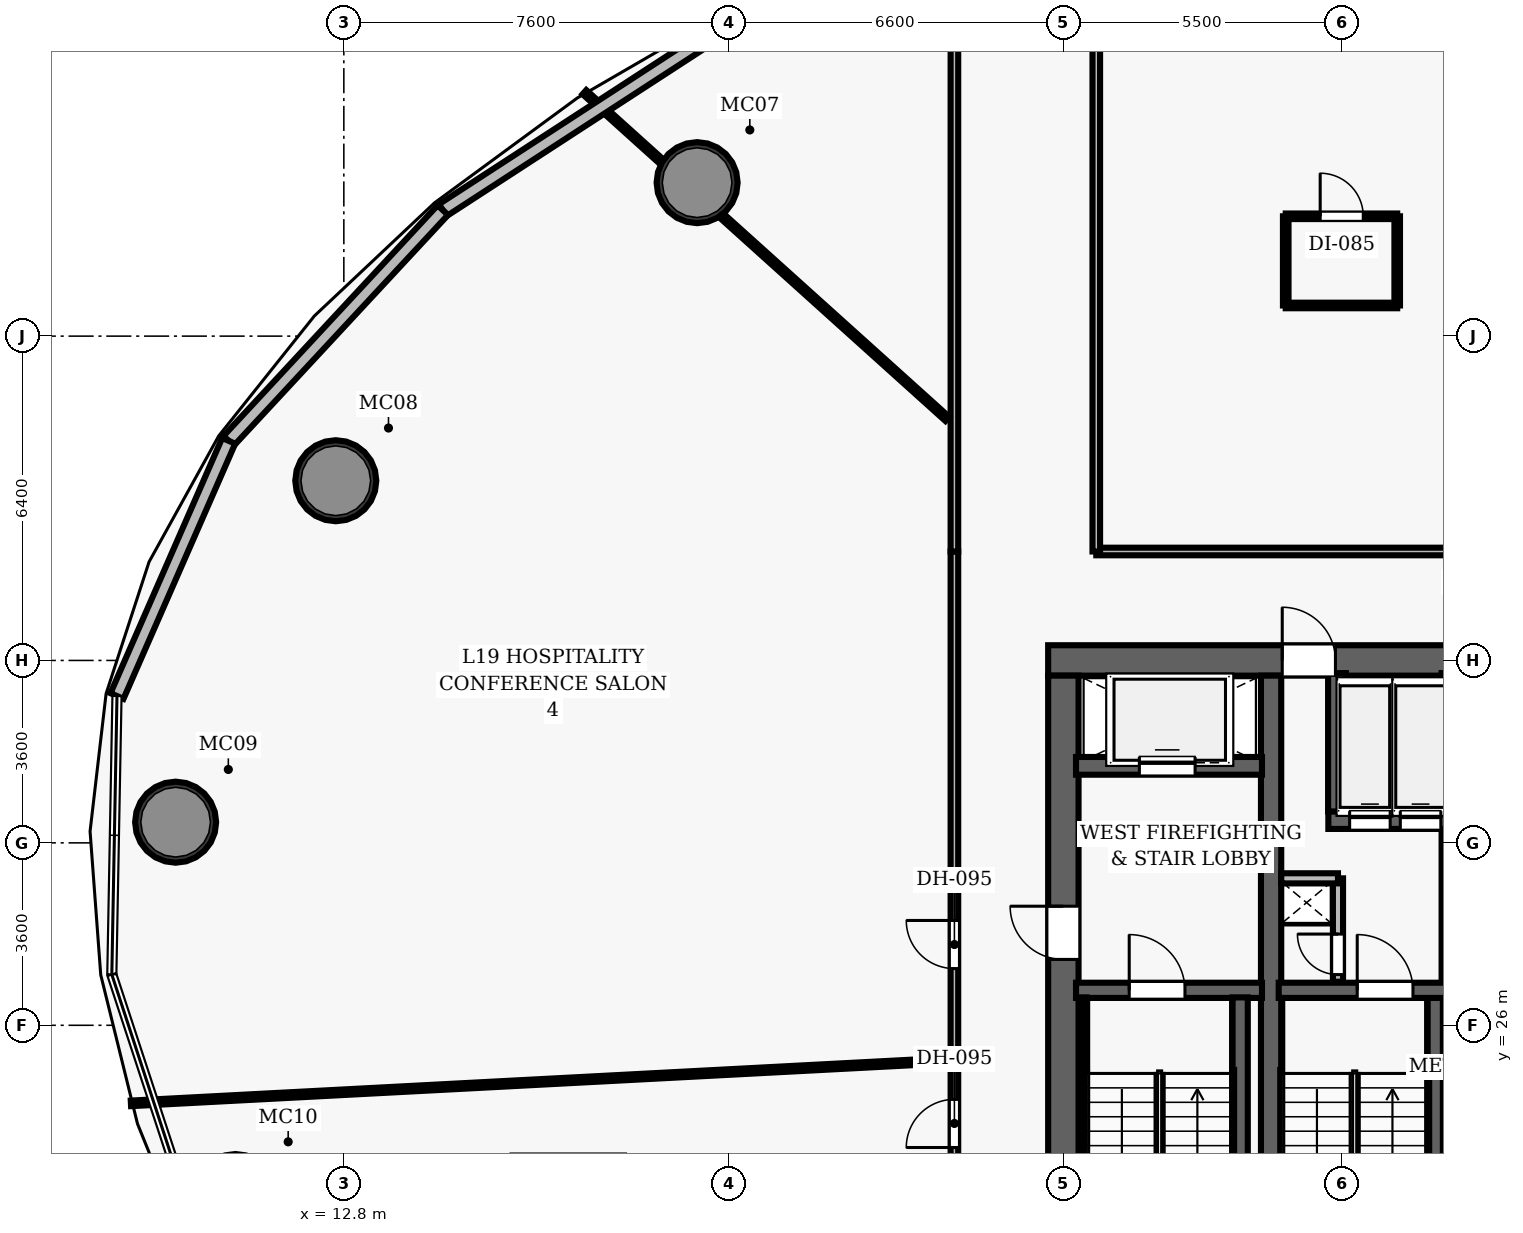
"""IFC4 building model, lengths in metres.
Left out: names, types, materials, properties, quantities, classifications, styles, units other than length and angle.
Written with IfcOpenShell. Run it as: python <this file> out.ifc"""

import sys

from ifc_helpers import new_model, si_unit, direction, frame, frame_2d, origin, origin_2d, place, context, subcontext, project, spatial, rectangle, hollow_circle, extrude, element, fill, save


model = new_model("IFC4")
c1 = context("Model", 3, precision=1e-05, world=origin(), true_north=direction((0.0, 1.0)))
c2 = subcontext(c1, "Body", "Model", "MODEL_VIEW")
j1 = project(units=[si_unit("LENGTHUNIT", "METRE"), si_unit("PLANEANGLEUNIT", "RADIAN")], contexts=[c1])
p1 = place(None, origin())
s1 = spatial("IfcSite", under=j1, at=p1, CompositionType="ELEMENT")
p2 = place(p1, origin())
s2 = spatial("IfcBuilding", under=s1, at=p2, CompositionType="ELEMENT")
p3 = place(p2, frame((0.0, 0.0, 83.4)))
s3 = spatial("IfcBuildingStorey", under=s2, at=p3, CompositionType="ELEMENT", Elevation=83.4)
p4 = place(p3, frame((26.7, 33.2, 0.0), z_axis=(0.0, 0.0, 1.0), x_axis=(1.0, 0.0, 0.0)))
e1 = element("IfcWall", 1, at=p4, inside=s3, PredefinedType="SHEAR", context=c2, shape_type="SweptSolid", body=[
    extrude(rectangle(XDim=22.6, YDim=0.6, at=frame_2d((11.3, 0.0))), origin(), (0.0, 0.0, 1.0), 3.5),
])
p5 = place(p4, frame((4.62, 0.0, 0.0)))
e2 = element("IfcOpeningElement", 2, at=p5, cuts=e1, PredefinedType="OPENING", context=c2, shape_type="SweptSolid", body=[
    extrude(rectangle(XDim=1.05, YDim=2.15, at=frame_2d((0.525, 1.075))), frame((0.0, 0.31, 0.0), z_axis=(0.0, -1.0, 0.0), x_axis=(1.0, 0.0, 0.0)), (0.0, 0.0, 1.0), 0.62),
])
p6 = place(p4, frame((14.52, 0.0, 0.0)))
e3 = element("IfcOpeningElement", 3, at=p6, cuts=e1, PredefinedType="OPENING", context=c2, shape_type="SweptSolid", body=[
    extrude(rectangle(XDim=1.05, YDim=2.15, at=frame_2d((0.525, 1.075))), frame((0.0, 0.31, 0.0), z_axis=(0.0, -1.0, 0.0), x_axis=(1.0, 0.0, 0.0)), (0.0, 0.0, 1.0), 0.62),
])
p7 = place(p3, frame((27.0, 19.1, 0.0), z_axis=(0.0, 0.0, 1.0), x_axis=(0.0, 1.0, 0.0)))
e4 = element("IfcWall", 4, at=p7, inside=s3, PredefinedType="SHEAR", context=c2, shape_type="SweptSolid", body=[
    extrude(rectangle(XDim=13.8, YDim=0.6, at=frame_2d((6.9, 0.0))), origin(), (0.0, 0.0, 1.0), 3.5),
])
p8 = place(p7, frame((8.2, 0.0, 0.0)))
e5 = element("IfcOpeningElement", 5, at=p8, cuts=e4, PredefinedType="OPENING", context=c2, shape_type="SweptSolid", body=[
    extrude(rectangle(XDim=1.05, YDim=2.15, at=frame_2d((0.525, 1.075))), frame((0.0, 0.31, 0.0), z_axis=(0.0, -1.0, 0.0), x_axis=(1.0, 0.0, 0.0)), (0.0, 0.0, 1.0), 0.62),
])
p9 = place(p3, frame((31.1, 19.1, 0.0), z_axis=(0.0, 0.0, 1.0), x_axis=(0.0, 1.0, 0.0)))
e6 = element("IfcWall", 6, at=p9, inside=s3, PredefinedType="SHEAR", context=c2, shape_type="SweptSolid", body=[
    extrude(rectangle(XDim=13.8, YDim=0.4, at=frame_2d((6.9, 0.0))), origin(), (0.0, 0.0, 1.0), 3.5),
])
for number, where, z_axis, x_axis in (
    (7, (19.772, 42.629, 0.0), (0.0, 0.0, 1.0), (1.0, 0.0, 0.0)),
    (8, (12.641, 36.746, 0.0), (0.0, 0.0, 1.0), (1.0, 0.0, 0.0)),
    (9, (9.48, 30.008, 0.0), (0.0, 0.0, 1.0), (1.0, 0.0, 0.0)),
):
    element("IfcColumn", number, at=place(p3, frame(where, z_axis=z_axis, x_axis=x_axis)), inside=s3, PredefinedType="COLUMN", context=c2, shape_type="SweptSolid", body=[
        extrude(hollow_circle(Radius=0.8, WallThickness=0.06, at=origin_2d()), origin(), (0.0, 0.0, 1.0), 3.5),
    ])
p10 = place(p3, frame((27.25, 26.69, 0.0), z_axis=(0.0, 0.0, 1.0), x_axis=(1.0, 0.0, 0.0)))
e10 = element("IfcWall", 10, at=p10, inside=s3, PredefinedType="SHEAR", context=c2, shape_type="SweptSolid", body=[
    extrude(rectangle(XDim=3.67, YDim=0.3, at=frame_2d((1.835, 0.0))), origin(), (0.0, 0.0, 1.0), 3.5),
])
p11 = place(p10, frame((1.05, 0.0, 0.0)))
e11 = element("IfcOpeningElement", 11, at=p11, cuts=e10, PredefinedType="OPENING", context=c2, shape_type="SweptSolid", body=[
    extrude(rectangle(XDim=1.1, YDim=2.15, at=frame_2d((0.55, 1.075))), frame((0.0, 0.16, 0.0), z_axis=(0.0, -1.0, 0.0), x_axis=(1.0, 0.0, 0.0)), (0.0, 0.0, 1.0), 0.32),
])
p12 = place(p3, frame((30.49, 19.05, 0.0), z_axis=(0.0, 0.0, 1.0), x_axis=(0.0, 1.0, 0.0)))
e12 = element("IfcWall", 12, at=p12, inside=s3, PredefinedType="SHEAR", context=c2, shape_type="SweptSolid", body=[
    extrude(rectangle(XDim=7.5, YDim=0.3, at=frame_2d((3.75, 0.0))), origin(), (0.0, 0.0, 1.0), 3.5),
])
p13 = place(p3, frame((27.395, 19.1, 0.0), z_axis=(0.0, 0.0, 1.0), x_axis=(0.0, 1.0, 0.0)))
e13 = element("IfcWall", 13, at=p13, inside=s3, PredefinedType="SHEAR", context=c2, shape_type="SweptSolid", body=[
    extrude(rectangle(XDim=7.45, YDim=0.12, at=frame_2d((3.725, 0.0))), origin(), (0.0, 0.0, 1.0), 3.5),
])
p14 = place(p3, frame((27.25, 31.12, 0.0), z_axis=(0.0, 0.0, 1.0), x_axis=(1.0, 0.0, 0.0)))
e14 = element("IfcWall", 14, at=p14, inside=s3, PredefinedType="SHEAR", context=c2, shape_type="SweptSolid", body=[
    extrude(rectangle(XDim=3.67, YDim=0.35, at=frame_2d((1.835, 0.0))), origin(), (0.0, 0.0, 1.0), 2.6),
])
p15 = place(p14, frame((1.25, 0.0, 0.0)))
e15 = element("IfcOpeningElement", 15, at=p15, cuts=e14, PredefinedType="OPENING", context=c2, shape_type="SweptSolid", body=[
    extrude(rectangle(XDim=1.1, YDim=2.15, at=frame_2d((0.55, 1.075))), frame((0.0, 0.185, 0.0), z_axis=(0.0, -1.0, 0.0), x_axis=(1.0, 0.0, 0.0)), (0.0, 0.0, 1.0), 0.37),
])
p16 = place(p3, frame((34.34, 19.05, 0.0), z_axis=(0.0, 0.0, 1.0), x_axis=(0.0, 1.0, 0.0)))
e16 = element("IfcWall", 16, at=p16, inside=s3, PredefinedType="SHEAR", context=c2, shape_type="SweptSolid", body=[
    extrude(rectangle(XDim=7.5, YDim=0.3, at=frame_2d((3.75, 0.0))), origin(), (0.0, 0.0, 1.0), 3.5),
])
p17 = place(p3, frame((34.64, 26.69, 0.0), z_axis=(0.0, 0.0, 1.0), x_axis=(0.0, 1.0, 0.0)))
e17 = element("IfcWall", 17, at=p17, inside=s3, PredefinedType="SHEAR", context=c2, shape_type="SweptSolid", body=[
    extrude(rectangle(XDim=6.26, YDim=0.35, at=frame_2d((3.13, 0.0))), origin(), (0.0, 0.0, 1.0), 3.5),
])
p18 = place(p3, frame((31.25, 26.69, 0.0), z_axis=(0.0, 0.0, 1.0), x_axis=(1.0, 0.0, 0.0)))
e18 = element("IfcWall", 18, at=p18, inside=s3, PredefinedType="SHEAR", context=c2, shape_type="SweptSolid", body=[
    extrude(rectangle(XDim=3.56, YDim=0.3, at=frame_2d((1.78, 0.0))), origin(), (0.0, 0.0, 1.0), 3.5),
])
p19 = place(p18, frame((1.55, 0.0, 0.0)))
e19 = element("IfcOpeningElement", 19, at=p19, cuts=e18, PredefinedType="OPENING", context=c2, shape_type="SweptSolid", body=[
    extrude(rectangle(XDim=1.1, YDim=2.15, at=frame_2d((0.55, 1.075))), frame((0.0, 0.16, 0.0), z_axis=(0.0, -1.0, 0.0), x_axis=(1.0, 0.0, 0.0)), (0.0, 0.0, 1.0), 0.32),
])
p20 = place(p3, frame((32.23, 30.05, 0.0), z_axis=(0.0, 0.0, 1.0), x_axis=(1.0, 0.0, 0.0)))
e20 = element("IfcWall", 20, at=p20, inside=s3, PredefinedType="SHEAR", context=c2, shape_type="SweptSolid", body=[
    extrude(rectangle(XDim=2.41, YDim=0.35, at=frame_2d((1.205, 0.0))), origin(), (0.0, 0.0, 1.0), 2.6),
])
p21 = place(p20, frame((0.42, 0.0, 0.0)))
e21 = element("IfcOpeningElement", 21, at=p21, cuts=e20, PredefinedType="OPENING", context=c2, shape_type="SweptSolid", body=[
    extrude(rectangle(XDim=0.8, YDim=2.15, at=frame_2d((0.4, 1.075))), frame((0.0, 0.185, 0.0), z_axis=(0.0, -1.0, 0.0), x_axis=(1.0, 0.0, 0.0)), (0.0, 0.0, 1.0), 0.37),
])
p22 = place(p20, frame((1.42, 0.0, 0.0)))
e22 = element("IfcOpeningElement", 22, at=p22, cuts=e20, PredefinedType="OPENING", context=c2, shape_type="SweptSolid", body=[
    extrude(rectangle(XDim=0.8, YDim=2.15, at=frame_2d((0.4, 1.075))), frame((0.0, 0.185, 0.0), z_axis=(0.0, -1.0, 0.0), x_axis=(1.0, 0.0, 0.0)), (0.0, 0.0, 1.0), 0.37),
])
p23 = place(p3, frame((32.4, 30.22, 0.0), z_axis=(0.0, 0.0, 1.0), x_axis=(0.0, 1.0, 0.0)))
e23 = element("IfcWall", 23, at=p23, inside=s3, PredefinedType="SHEAR", context=c2, shape_type="SweptSolid", body=[
    extrude(rectangle(XDim=2.73, YDim=0.35, at=frame_2d((1.365, 0.0))), origin(), (0.0, 0.0, 1.0), 2.6),
])
p24 = place(p3, frame((32.42, 26.86, 0.0), z_axis=(0.0, 0.0, 1.0), x_axis=(0.0, 1.0, 0.0)))
e24 = element("IfcWall", 24, at=p24, inside=s3, PredefinedType="PARTITIONING", context=c2, shape_type="SweptSolid", body=[
    extrude(rectangle(XDim=2.04, YDim=0.2, at=frame_2d((1.02, 0.0))), origin(), (0.0, 0.0, 1.0), 2.6),
])
p25 = place(p24, frame((0.14, 0.0, 0.0)))
e25 = element("IfcOpeningElement", 25, at=p25, cuts=e24, PredefinedType="OPENING", context=c2, shape_type="SweptSolid", body=[
    extrude(rectangle(XDim=0.8, YDim=2.05, at=frame_2d((0.4, 1.025))), frame((0.0, 0.11, 0.0), z_axis=(0.0, -1.0, 0.0), x_axis=(1.0, 0.0, 0.0)), (0.0, 0.0, 1.0), 0.22),
])
p26 = place(p3, frame((31.3, 28.9, 0.0), z_axis=(0.0, 0.0, 1.0), x_axis=(1.0, 0.0, 0.0)))
e26 = element("IfcWall", 26, at=p26, inside=s3, PredefinedType="PARTITIONING", context=c2, shape_type="SweptSolid", body=[
    extrude(rectangle(XDim=1.12, YDim=0.2, at=frame_2d((0.56, 0.0))), origin(), (0.0, 0.0, 1.0), 2.6),
])
p27 = place(p3, frame((27.65, 35.35, 0.0), z_axis=(0.0, 0.0, 1.0), x_axis=(1.0, 0.0, 0.0)))
e27 = element("IfcWall", 27, at=p27, inside=s3, PredefinedType="PARTITIONING", context=c2, shape_type="SweptSolid", body=[
    extrude(rectangle(XDim=23.5, YDim=0.15, at=frame_2d((11.75, 0.0))), origin(), (0.0, 0.0, 1.0), 2.6),
])
p28 = place(p27, frame((11.493, 0.0, 0.0)))
e28 = element("IfcOpeningElement", 28, at=p28, cuts=e27, PredefinedType="OPENING", context=c2, shape_type="SweptSolid", body=[
    extrude(rectangle(XDim=0.95, YDim=2.15, at=frame_2d((0.475, 1.075))), frame((0.0, 0.085, 0.0), z_axis=(0.0, -1.0, 0.0), x_axis=(1.0, 0.0, 0.0)), (0.0, 0.0, 1.0), 0.17),
])
p29 = place(p27, frame((7.137, 0.0, 0.0)))
e29 = element("IfcOpeningElement", 29, at=p29, cuts=e27, PredefinedType="OPENING", context=c2, shape_type="SweptSolid", body=[
    extrude(rectangle(XDim=0.95, YDim=2.15, at=frame_2d((0.475, 1.075))), frame((0.0, 0.085, 0.0), z_axis=(0.0, -1.0, 0.0), x_axis=(1.0, 0.0, 0.0)), (0.0, 0.0, 1.0), 0.17),
])
p30 = place(p3, frame((24.85, 19.45, 0.0), z_axis=(0.0, 0.0, 1.0), x_axis=(0.0, 1.0, 0.0)))
e30 = element("IfcWall", 30, at=p30, inside=s3, PredefinedType="PARTITIONING", context=c2, shape_type="SweptSolid", body=[
    extrude(rectangle(XDim=15.9, YDim=0.15, at=frame_2d((7.95, 0.0))), origin(), (0.0, 0.0, 1.0), 2.6),
])
p31 = place(p30, frame((7.669, 0.0, 0.0)))
e31 = element("IfcOpeningElement", 31, at=p31, cuts=e30, PredefinedType="OPENING", context=c2, shape_type="SweptSolid", body=[
    extrude(rectangle(XDim=0.95, YDim=2.15, at=frame_2d((0.475, 1.075))), frame((0.0, 0.085, 0.0), z_axis=(0.0, -1.0, 0.0), x_axis=(1.0, 0.0, 0.0)), (0.0, 0.0, 1.0), 0.17),
])
p32 = place(p30, frame((4.138, 0.0, 0.0)))
e32 = element("IfcOpeningElement", 32, at=p32, cuts=e30, PredefinedType="OPENING", context=c2, shape_type="SweptSolid", body=[
    extrude(rectangle(XDim=0.95, YDim=2.15, at=frame_2d((0.475, 1.075))), frame((0.0, 0.085, 0.0), z_axis=(0.0, -1.0, 0.0), x_axis=(1.0, 0.0, 0.0)), (0.0, 0.0, 1.0), 0.17),
])
for number, where, z_axis, x_axis in (
    (33, (24.85, 35.35, 0.0), (0.0, 0.0, 1.0), (0.0, 1.0, 0.0)),
    (34, (27.65, 35.35, 0.0), (0.0, 0.0, 1.0), (0.0, 1.0, 0.0)),
):
    element("IfcWall", number, at=place(p3, frame(where, z_axis=z_axis, x_axis=x_axis)), inside=s3, PredefinedType="PARTITIONING", context=c2, shape_type="SweptSolid", body=[
        extrude(rectangle(XDim=10.15, YDim=0.15, at=frame_2d((5.075, 0.0))), origin(), (0.0, 0.0, 1.0), 2.6),
    ])
p33 = place(p3, frame((24.71, 37.966, 0.0), z_axis=(0.0, 0.0, 1.0), x_axis=(-0.743136670625, 0.669139663129, 0.0)))
e35 = element("IfcWall", 35, at=p33, inside=s3, PredefinedType="PARTITIONING", context=c2, shape_type="SweptSolid", body=[
    extrude(rectangle(XDim=9.637, YDim=0.11, at=frame_2d((4.819, 0.0))), origin(), (0.0, 0.0, 1.0), 2.6),
])
p34 = place(p3, frame((24.71, 25.303, 0.0), z_axis=(0.0, 0.0, 1.0), x_axis=(-0.998629300498, -0.052340425941, 0.0)))
e36 = element("IfcWall", 36, at=p34, inside=s3, PredefinedType="PARTITIONING", context=c2, shape_type="SweptSolid", body=[
    extrude(rectangle(XDim=16.135, YDim=0.11, at=frame_2d((8.067, 0.0))), origin(), (0.0, 0.0, 1.0), 2.6),
])
p35 = place(p3, frame((31.389, 40.205, 0.0), z_axis=(0.0, 0.0, 1.0), x_axis=(1.0, 0.0, 0.0)))
e37 = element("IfcWall", 37, at=p35, inside=s3, PredefinedType="PARTITIONING", context=c2, shape_type="SweptSolid", body=[
    extrude(rectangle(XDim=2.2, YDim=0.11, at=frame_2d((1.1, 0.0))), origin(), (0.0, 0.0, 1.0), 2.6),
])
p36 = place(p3, frame((31.389, 41.965, 0.0), z_axis=(0.0, 0.0, 1.0), x_axis=(1.0, 0.0, 0.0)))
e38 = element("IfcWall", 38, at=p36, inside=s3, PredefinedType="PARTITIONING", context=c2, shape_type="SweptSolid", body=[
    extrude(rectangle(XDim=2.2, YDim=0.11, at=frame_2d((1.1, 0.0))), origin(), (0.0, 0.0, 1.0), 2.6),
])
p37 = place(p36, frame((0.68, 0.0, 0.0)))
e39 = element("IfcOpeningElement", 39, at=p37, cuts=e38, PredefinedType="OPENING", context=c2, shape_type="SweptSolid", body=[
    extrude(rectangle(XDim=0.85, YDim=2.1, at=frame_2d((0.425, 1.05))), frame((0.0, 0.065, 0.0), z_axis=(0.0, -1.0, 0.0), x_axis=(1.0, 0.0, 0.0)), (0.0, 0.0, 1.0), 0.13),
])
for number, where, z_axis, x_axis in (
    (40, (31.389, 40.205, 0.0), (0.0, 0.0, 1.0), (0.0, 1.0, 0.0)),
    (41, (33.589, 40.205, 0.0), (0.0, 0.0, 1.0), (0.0, 1.0, 0.0)),
):
    element("IfcWall", number, at=place(p3, frame(where, z_axis=z_axis, x_axis=x_axis)), inside=s3, PredefinedType="PARTITIONING", context=c2, shape_type="SweptSolid", body=[
        extrude(rectangle(XDim=1.76, YDim=0.11, at=frame_2d((0.88, 0.0))), origin(), (0.0, 0.0, 1.0), 2.6),
    ])
p38 = place(p3, frame((14.754, 42.087, 0.0), z_axis=(0.0, 0.0, 1.0), x_axis=(0.838544340637, 0.544833358731, 0.0)))
e42 = element("IfcWall", 42, at=p38, inside=s3, PredefinedType="SOLIDWALL", context=c2, shape_type="SweptSolid", body=[
    extrude(rectangle(XDim=7.143, YDim=0.28, at=frame_2d((3.571, 0.0))), origin(), (0.0, 0.0, 1.0), 3.25),
])
p39 = place(p3, frame((10.527, 37.534, 0.0), z_axis=(0.0, 0.0, 1.0), x_axis=(0.680366679976, 0.732871872007, 0.0)))
e43 = element("IfcWall", 43, at=p39, inside=s3, PredefinedType="SOLIDWALL", context=c2, shape_type="SweptSolid", body=[
    extrude(rectangle(XDim=6.212, YDim=0.28, at=frame_2d((3.106, 0.0))), origin(), (0.0, 0.0, 1.0), 3.25),
])
p40 = place(p3, frame((8.323, 32.498, 0.0), z_axis=(0.0, 0.0, 1.0), x_axis=(0.400939977134, 0.916104325247, 0.0)))
e44 = element("IfcWall", 44, at=p40, inside=s3, PredefinedType="SOLIDWALL", context=c2, shape_type="SweptSolid", body=[
    extrude(rectangle(XDim=5.497, YDim=0.28, at=frame_2d((2.749, 0.0))), origin(), (0.0, 0.0, 1.0), 3.25),
])
p41 = place(p11, origin())
e45 = element("IfcDoor", 45, at=p41, inside=s3, OperationType="SINGLE_SWING_LEFT", PredefinedType="DOOR", context=c2, shape_type="SweptSolid", body=[
    extrude(rectangle(XDim=1.1, YDim=2.15, at=frame_2d((0.55, 1.075))), frame((0.0, 0.025, 0.0), z_axis=(0.0, -1.0, 0.0), x_axis=(1.0, 0.0, 0.0)), (0.0, 0.0, 1.0), 0.05),
])
fill(e11, e45)
p42 = place(p8, origin())
e46 = element("IfcDoor", 46, at=p42, inside=s3, OperationType="SINGLE_SWING_RIGHT", PredefinedType="DOOR", context=c2, shape_type="SweptSolid", body=[
    extrude(rectangle(XDim=1.05, YDim=2.15, at=frame_2d((0.525, 1.075))), frame((0.0, 0.025, 0.0), z_axis=(0.0, -1.0, 0.0), x_axis=(1.0, 0.0, 0.0)), (0.0, 0.0, 1.0), 0.05),
])
fill(e5, e46)
p43 = place(p19, origin())
e47 = element("IfcDoor", 47, at=p43, inside=s3, OperationType="SINGLE_SWING_LEFT", PredefinedType="DOOR", context=c2, shape_type="SweptSolid", body=[
    extrude(rectangle(XDim=1.1, YDim=2.15, at=frame_2d((0.55, 1.075))), frame((0.0, 0.025, 0.0), z_axis=(0.0, -1.0, 0.0), x_axis=(1.0, 0.0, 0.0)), (0.0, 0.0, 1.0), 0.05),
])
fill(e19, e47)
p44 = place(p25, origin())
e48 = element("IfcDoor", 48, at=p44, inside=s3, OperationType="SINGLE_SWING_RIGHT", PredefinedType="DOOR", context=c2, shape_type="SweptSolid", body=[
    extrude(rectangle(XDim=0.8, YDim=2.05, at=frame_2d((0.4, 1.025))), frame((0.0, 0.025, 0.0), z_axis=(0.0, -1.0, 0.0), x_axis=(1.0, 0.0, 0.0)), (0.0, 0.0, 1.0), 0.05),
])
fill(e25, e48)
p45 = place(p5, origin())
e49 = element("IfcDoor", 49, at=p45, inside=s3, OperationType="SINGLE_SWING_LEFT", PredefinedType="DOOR", context=c2, shape_type="SweptSolid", body=[
    extrude(rectangle(XDim=1.05, YDim=2.15, at=frame_2d((0.525, 1.075))), frame((0.0, 0.025, 0.0), z_axis=(0.0, -1.0, 0.0), x_axis=(1.0, 0.0, 0.0)), (0.0, 0.0, 1.0), 0.05),
])
fill(e2, e49)
p46 = place(p37, origin())
e50 = element("IfcDoor", 50, at=p46, inside=s3, OperationType="SINGLE_SWING_LEFT", PredefinedType="DOOR", context=c2, shape_type="SweptSolid", body=[
    extrude(rectangle(XDim=0.85, YDim=2.1, at=frame_2d((0.425, 1.05))), frame((0.0, 0.025, 0.0), z_axis=(0.0, -1.0, 0.0), x_axis=(1.0, 0.0, 0.0)), (0.0, 0.0, 1.0), 0.05),
])
fill(e39, e50)
p47 = place(p31, origin())
e51 = element("IfcDoor", 51, at=p47, inside=s3, OperationType="SINGLE_SWING_RIGHT", PredefinedType="DOOR", context=c2, shape_type="SweptSolid", body=[
    extrude(rectangle(XDim=0.95, YDim=2.15, at=frame_2d((0.475, 1.075))), frame((0.0, 0.025, 0.0), z_axis=(0.0, -1.0, 0.0), x_axis=(1.0, 0.0, 0.0)), (0.0, 0.0, 1.0), 0.05),
])
fill(e31, e51)
p48 = place(p32, origin())
e52 = element("IfcDoor", 52, at=p48, inside=s3, OperationType="SINGLE_SWING_LEFT", PredefinedType="DOOR", context=c2, shape_type="SweptSolid", body=[
    extrude(rectangle(XDim=0.95, YDim=2.15, at=frame_2d((0.475, 1.075))), frame((0.0, 0.025, 0.0), z_axis=(0.0, -1.0, 0.0), x_axis=(1.0, 0.0, 0.0)), (0.0, 0.0, 1.0), 0.05),
])
fill(e32, e52)
p49 = place(p15, origin())
e53 = element("IfcDoor", 53, at=p49, inside=s3, OperationType="SLIDING_TO_LEFT", PredefinedType="DOOR", context=c2, shape_type="SweptSolid", body=[
    extrude(rectangle(XDim=1.1, YDim=2.15, at=frame_2d((0.55, 1.075))), frame((0.0, 0.025, 0.0), z_axis=(0.0, -1.0, 0.0), x_axis=(1.0, 0.0, 0.0)), (0.0, 0.0, 1.0), 0.05),
])
fill(e15, e53)
p50 = place(p21, origin())
e54 = element("IfcDoor", 54, at=p50, inside=s3, OperationType="SLIDING_TO_LEFT", PredefinedType="DOOR", context=c2, shape_type="SweptSolid", body=[
    extrude(rectangle(XDim=0.8, YDim=2.15, at=frame_2d((0.4, 1.075))), frame((0.0, 0.025, 0.0), z_axis=(0.0, -1.0, 0.0), x_axis=(1.0, 0.0, 0.0)), (0.0, 0.0, 1.0), 0.05),
])
fill(e21, e54)
p51 = place(p22, origin())
e55 = element("IfcDoor", 55, at=p51, inside=s3, OperationType="SLIDING_TO_LEFT", PredefinedType="DOOR", context=c2, shape_type="SweptSolid", body=[
    extrude(rectangle(XDim=0.8, YDim=2.15, at=frame_2d((0.4, 1.075))), frame((0.0, 0.025, 0.0), z_axis=(0.0, -1.0, 0.0), x_axis=(1.0, 0.0, 0.0)), (0.0, 0.0, 1.0), 0.05),
])
fill(e22, e55)
save(model, sys.argv[1])
